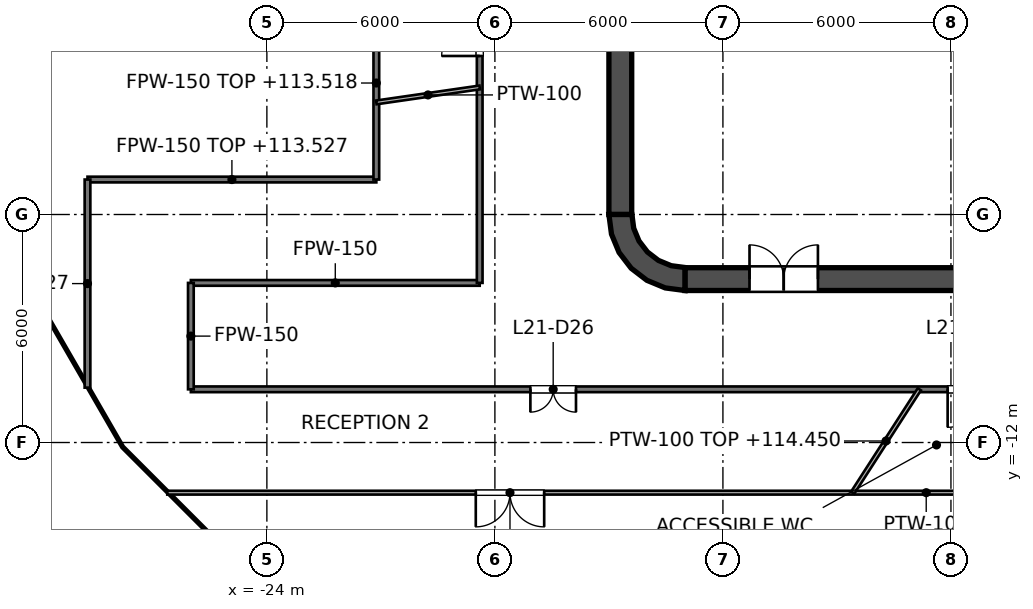
"""IFC4 building model, lengths in metres.
Left out: names, types, materials, properties, quantities, classifications, styles, units other than length and angle.
Written with IfcOpenShell. Run it as: python <this file> out.ifc"""

import sys

from ifc_helpers import new_model, si_unit, direction, frame, frame_2d, origin, place, context, subcontext, project, spatial, polyline, rectangle, outline, extrude, element, fill, save


model = new_model("IFC4")
c1 = context("Model", 3, precision=1e-05, world=origin(), true_north=direction((0.0, 1.0)))
c2 = subcontext(c1, "Body", "Model", "MODEL_VIEW")
j1 = project(units=[si_unit("LENGTHUNIT", "METRE"), si_unit("PLANEANGLEUNIT", "RADIAN")], contexts=[c1])
p1 = place(None, origin())
s1 = spatial("IfcSite", under=j1, at=p1, CompositionType="ELEMENT")
p2 = place(p1, origin())
s2 = spatial("IfcBuilding", under=s1, at=p2, CompositionType="ELEMENT")
p3 = place(p2, frame((0.0, 0.0, 110.4)))
s3 = spatial("IfcBuildingStorey", under=s2, at=p3, CompositionType="ELEMENT", Elevation=110.4)
p4 = place(p3, frame((-13.0, -7.7, 0.0), z_axis=(0.0, 0.0, 1.0), x_axis=(1.0, 0.0, 0.0)))
e1 = element("IfcWall", 1, at=p4, inside=s3, PredefinedType="SHEAR", context=c2, shape_type="SweptSolid", body=[
    extrude(rectangle(XDim=26.0, YDim=0.6, at=frame_2d((13.0, 0.0))), origin(), (0.0, 0.0, 1.0), 4.2),
])
p5 = place(p4, frame((1.7, 0.0, 0.0)))
e2 = element("IfcOpeningElement", 2, at=p5, cuts=e1, PredefinedType="OPENING", context=c2, shape_type="SweptSolid", body=[
    extrude(rectangle(XDim=1.8, YDim=2.1, at=frame_2d((0.9, 1.05))), frame((0.0, 0.3, 0.0), z_axis=(0.0, -1.0, 0.0), x_axis=(1.0, 0.0, 0.0)), (0.0, 0.0, 1.0), 0.6),
])
p6 = place(p4, frame((22.5, 0.0, 0.0)))
e3 = element("IfcOpeningElement", 3, at=p6, cuts=e1, PredefinedType="OPENING", context=c2, shape_type="SweptSolid", body=[
    extrude(rectangle(XDim=1.8, YDim=2.1, at=frame_2d((0.9, 1.05))), frame((0.0, 0.3, 0.0), z_axis=(0.0, -1.0, 0.0), x_axis=(1.0, 0.0, 0.0)), (0.0, 0.0, 1.0), 0.6),
])
p7 = place(p3, frame((-14.7, -6.0, 0.0), z_axis=(0.0, 0.0, 1.0), x_axis=(0.0, 1.0, 0.0)))
e4 = element("IfcWall", 4, at=p7, inside=s3, PredefinedType="SHEAR", context=c2, shape_type="SweptSolid", body=[
    extrude(rectangle(XDim=12.0, YDim=0.6, at=frame_2d((6.0, 0.0))), origin(), (0.0, 0.0, 1.0), 4.2),
])
p8 = place(p3, origin())
e5 = element("IfcWall", 5, at=p8, inside=s3, PredefinedType="SHEAR", context=c2, shape_type="SweptSolid", body=[
    extrude(outline(polyline([(-13.0, -8.0), (-13.0, -7.395), (-13.361, -7.347), (-13.698, -7.208), (-13.986, -6.986), (-14.208, -6.698), (-14.347, -6.361), (-14.395, -6.0), (-15.0, -6.0), (-14.932, -6.518), (-14.732, -7.0), (-14.414, -7.414), (-14.0, -7.732), (-13.518, -7.932), (-13.0, -8.0)])), origin(), (0.0, 0.0, 1.0), 4.2),
])
p9 = place(p3, frame((-9.0, -6.6, 0.0), z_axis=(0.0, 0.0, 1.0), x_axis=(0.0, 1.0, 0.0)))
e6 = element("IfcWall", 6, at=p9, inside=s3, PredefinedType="PARTITIONING", context=c2, shape_type="SweptSolid", body=[
    extrude(rectangle(XDim=2.5, YDim=0.25, at=frame_2d((1.25, 0.0))), origin(), (0.0, 0.0, 1.0), 4.05),
])
p10 = place(p9, frame((0.75, 0.0, 0.0)))
e7 = element("IfcOpeningElement", 7, at=p10, cuts=e6, PredefinedType="OPENING", context=c2, shape_type="SweptSolid", body=[
    extrude(rectangle(XDim=1.0, YDim=2.1, at=frame_2d((0.5, 1.05))), frame((0.0, 0.125, 0.0), z_axis=(0.0, -1.0, 0.0), x_axis=(1.0, 0.0, 0.0)), (0.0, 0.0, 1.0), 0.25),
])
p11 = place(p3, frame((-9.125, -7.0, 0.0), z_axis=(0.0, 0.0, 1.0), x_axis=(1.0, 0.0, 0.0)))
e8 = element("IfcWall", 8, at=p11, inside=s3, PredefinedType="SOLIDWALL", context=c2, shape_type="SweptSolid", body=[
    extrude(rectangle(XDim=18.25, YDim=0.8, at=frame_2d((9.125, 0.0))), origin(), (0.0, 0.0, 1.0), 4.05),
])
p12 = place(p3, frame((-9.125, -3.975, 0.0), z_axis=(0.0, 0.0, 1.0), x_axis=(1.0, 0.0, 0.0)))
e9 = element("IfcWall", 9, at=p12, inside=s3, PredefinedType="SOLIDWALL", context=c2, shape_type="SweptSolid", body=[
    extrude(rectangle(XDim=12.4, YDim=0.25, at=frame_2d((6.2, 0.0))), origin(), (0.0, 0.0, 1.0), 4.05),
])
p13 = place(p12, frame((1.05, 0.0, 0.0)))
e10 = element("IfcOpeningElement", 10, at=p13, cuts=e9, PredefinedType="OPENING", context=c2, shape_type="SweptSolid", body=[
    extrude(rectangle(XDim=1.2, YDim=2.1, at=frame_2d((0.6, 1.05))), frame((0.0, 0.125, 0.0), z_axis=(0.0, -1.0, 0.0), x_axis=(1.0, 0.0, 0.0)), (0.0, 0.0, 1.0), 0.25),
])
p14 = place(p12, frame((4.1, 0.0, 0.0)))
e11 = element("IfcOpeningElement", 11, at=p14, cuts=e9, PredefinedType="OPENING", context=c2, shape_type="SweptSolid", body=[
    extrude(rectangle(XDim=1.2, YDim=2.1, at=frame_2d((0.6, 1.05))), frame((0.0, 0.125, 0.0), z_axis=(0.0, -1.0, 0.0), x_axis=(1.0, 0.0, 0.0)), (0.0, 0.0, 1.0), 0.25),
])
for number, where, z_axis, x_axis in (
    (12, (-9.0, -3.85, 0.0), (0.0, 0.0, 1.0), (0.0, 1.0, 0.0)),
    (13, (-5.95, -3.85, 0.0), (0.0, 0.0, 1.0), (0.0, 1.0, 0.0)),
):
    element("IfcWall", number, at=place(p3, frame(where, z_axis=z_axis, x_axis=x_axis)), inside=s3, PredefinedType="SOLIDWALL", context=c2, shape_type="SweptSolid", body=[
        extrude(rectangle(XDim=2.2, YDim=0.25, at=frame_2d((1.1, 0.0))), origin(), (0.0, 0.0, 1.0), 4.05),
    ])
p15 = place(p3, frame((-11.8, -7.4, 0.0), z_axis=(0.0, 0.0, 1.0), x_axis=(0.0, 1.0, 0.0)))
e14 = element("IfcWall", 14, at=p15, inside=s3, PredefinedType="SOLIDWALL", context=c2, shape_type="SweptSolid", body=[
    extrude(rectangle(XDim=14.8, YDim=0.4, at=frame_2d((7.4, 0.0))), origin(), (0.0, 0.0, 1.0), 4.05),
])
p16 = place(p15, frame((11.2, 0.0, 0.0)))
e15 = element("IfcOpeningElement", 15, at=p16, cuts=e14, PredefinedType="OPENING", context=c2, shape_type="SweptSolid", body=[
    extrude(rectangle(XDim=1.1, YDim=2.1, at=frame_2d((0.55, 1.05))), frame((0.0, 0.2, 0.0), z_axis=(0.0, -1.0, 0.0), x_axis=(1.0, 0.0, 0.0)), (0.0, 0.0, 1.0), 0.4),
])
p17 = place(p15, frame((8.3, 0.0, 0.0)))
e16 = element("IfcOpeningElement", 16, at=p17, cuts=e14, PredefinedType="OPENING", context=c2, shape_type="SweptSolid", body=[
    extrude(rectangle(XDim=1.1, YDim=2.1, at=frame_2d((0.55, 1.05))), frame((0.0, 0.2, 0.0), z_axis=(0.0, -1.0, 0.0), x_axis=(1.0, 0.0, 0.0)), (0.0, 0.0, 1.0), 0.4),
])
p18 = place(p15, frame((5.4, 0.0, 0.0)))
e17 = element("IfcOpeningElement", 17, at=p18, cuts=e14, PredefinedType="OPENING", context=c2, shape_type="SweptSolid", body=[
    extrude(rectangle(XDim=1.1, YDim=2.1, at=frame_2d((0.55, 1.05))), frame((0.0, 0.2, 0.0), z_axis=(0.0, -1.0, 0.0), x_axis=(1.0, 0.0, 0.0)), (0.0, 0.0, 1.0), 0.4),
])
p19 = place(p15, frame((13.552, 0.0, 0.0)))
e18 = element("IfcOpeningElement", 18, at=p19, cuts=e14, PredefinedType="OPENING", context=c2, shape_type="SweptSolid", body=[
    extrude(rectangle(XDim=0.9, YDim=2.1, at=frame_2d((0.45, 1.05))), frame((0.0, 0.2, 0.0), z_axis=(0.0, -1.0, 0.0), x_axis=(1.0, 0.0, 0.0)), (0.0, 0.0, 1.0), 0.4),
])
p20 = place(p15, frame((0.347, 0.0, 0.0)))
e19 = element("IfcOpeningElement", 19, at=p20, cuts=e14, PredefinedType="OPENING", context=c2, shape_type="SweptSolid", body=[
    extrude(rectangle(XDim=0.9, YDim=2.1, at=frame_2d((0.45, 1.05))), frame((0.0, 0.2, 0.0), z_axis=(0.0, -1.0, 0.0), x_axis=(1.0, 0.0, 0.0)), (0.0, 0.0, 1.0), 0.4),
])
e20 = element("IfcWall", 20, at=p8, inside=s3, PredefinedType="SOLIDWALL", context=c2, shape_type="SweptSolid", body=[
    extrude(outline(polyline([(-12.0, -5.925), (-12.0, -5.675), (-14.15, -5.675), (-14.15, -3.025), (-12.0, -3.025), (-12.0, -2.775), (-14.15, -2.775), (-14.15, -0.125), (-12.0, -0.125), (-12.0, 0.125), (-14.15, 0.125), (-14.15, 2.775), (-12.0, 2.775), (-12.0, 3.025), (-14.15, 3.025), (-14.15, 5.675), (-12.0, 5.675), (-12.0, 5.925), (-14.15, 5.925), (-14.4, 5.925), (-14.4, 5.675), (-14.4, 3.025), (-14.4, 2.775), (-14.4, 0.125), (-14.4, -0.125), (-14.4, -2.775), (-14.4, -3.025), (-14.4, -5.675), (-14.4, -5.925), (-14.15, -5.925), (-12.0, -5.925)])), origin(), (0.0, 0.0, 1.0), 4.05),
])
p21 = place(p3, frame((-26.0, -10.6, 0.0), z_axis=(0.0, 0.0, 1.0), x_axis=(1.0, 0.0, 0.0)))
e21 = element("IfcWall", 21, at=p21, inside=s3, PredefinedType="PARTITIONING", context=c2, shape_type="SweptSolid", body=[
    extrude(rectangle(XDim=52.0, YDim=0.15, at=frame_2d((26.0, 0.0))), origin(), (0.0, 0.0, 1.0), 3.127),
])
p22 = place(p21, frame((8.934, 0.0, 0.0)))
e22 = element("IfcOpeningElement", 22, at=p22, cuts=e21, PredefinedType="OPENING", context=c2, shape_type="SweptSolid", body=[
    extrude(rectangle(XDim=1.2, YDim=2.1, at=frame_2d((0.6, 1.05))), frame((0.0, 0.075, 0.0), z_axis=(0.0, -1.0, 0.0), x_axis=(1.0, 0.0, 0.0)), (0.0, 0.0, 1.0), 0.15),
])
p23 = place(p21, frame((19.913, 0.0, 0.0)))
e23 = element("IfcOpeningElement", 23, at=p23, cuts=e21, PredefinedType="OPENING", context=c2, shape_type="SweptSolid", body=[
    extrude(rectangle(XDim=1.0, YDim=2.1, at=frame_2d((0.5, 1.05))), frame((0.0, 0.075, 0.0), z_axis=(0.0, -1.0, 0.0), x_axis=(1.0, 0.0, 0.0)), (0.0, 0.0, 1.0), 0.15),
])
p24 = place(p21, frame((21.763, 0.0, 0.0)))
e24 = element("IfcOpeningElement", 24, at=p24, cuts=e21, PredefinedType="OPENING", context=c2, shape_type="SweptSolid", body=[
    extrude(rectangle(XDim=1.0, YDim=2.1, at=frame_2d((0.5, 1.05))), frame((0.0, 0.075, 0.0), z_axis=(0.0, -1.0, 0.0), x_axis=(1.0, 0.0, 0.0)), (0.0, 0.0, 1.0), 0.15),
])
p25 = place(p21, frame((29.38, 0.0, 0.0)))
e25 = element("IfcOpeningElement", 25, at=p25, cuts=e21, PredefinedType="OPENING", context=c2, shape_type="SweptSolid", body=[
    extrude(rectangle(XDim=1.0, YDim=2.1, at=frame_2d((0.5, 1.05))), frame((0.0, 0.075, 0.0), z_axis=(0.0, -1.0, 0.0), x_axis=(1.0, 0.0, 0.0)), (0.0, 0.0, 1.0), 0.15),
])
p26 = place(p21, frame((41.202, 0.0, 0.0)))
e26 = element("IfcOpeningElement", 26, at=p26, cuts=e21, PredefinedType="OPENING", context=c2, shape_type="SweptSolid", body=[
    extrude(rectangle(XDim=1.0, YDim=2.1, at=frame_2d((0.5, 1.05))), frame((0.0, 0.075, 0.0), z_axis=(0.0, -1.0, 0.0), x_axis=(1.0, 0.0, 0.0)), (0.0, 0.0, 1.0), 0.15),
])
p27 = place(p3, frame((-26.0, -7.8, 0.0), z_axis=(0.0, 0.0, 1.0), x_axis=(1.0, 0.0, 0.0)))
e27 = element("IfcWall", 27, at=p27, inside=s3, PredefinedType="PARTITIONING", context=c2, shape_type="SweptSolid", body=[
    extrude(rectangle(XDim=7.6, YDim=0.15, at=frame_2d((3.8, 0.0))), origin(), (0.0, 0.0, 1.0), 3.195),
])
p28 = place(p3, frame((-28.72, -5.08, 0.0), z_axis=(0.0, 0.0, 1.0), x_axis=(1.0, 0.0, 0.0)))
e28 = element("IfcWall", 28, at=p28, inside=s3, PredefinedType="PARTITIONING", context=c2, shape_type="SweptSolid", body=[
    extrude(rectangle(XDim=7.6, YDim=0.15, at=frame_2d((3.8, 0.0))), origin(), (0.0, 0.0, 1.0), 3.127),
])
p29 = place(p3, frame((-6.365, -23.754, 0.0), z_axis=(0.0, 0.0, 1.0), x_axis=(0.258859748235, 0.965914918998, 0.0)))
e29 = element("IfcWall", 29, at=p29, inside=s3, PredefinedType="PARTITIONING", context=c2, shape_type="SweptSolid", body=[
    extrude(rectangle(XDim=13.618, YDim=0.15, at=frame_2d((6.809, 0.0))), origin(), (0.0, 0.0, 1.0), 3.502),
])
p30 = place(p3, frame((-18.4, -7.8, 0.0), z_axis=(0.0, 0.0, 1.0), x_axis=(0.0, 1.0, 0.0)))
e30 = element("IfcWall", 30, at=p30, inside=s3, PredefinedType="PARTITIONING", context=c2, shape_type="SweptSolid", body=[
    extrude(rectangle(XDim=15.6, YDim=0.15, at=frame_2d((7.8, 0.0))), origin(), (0.0, 0.0, 1.0), 3.118),
])
p31 = place(p30, frame((5.971, 0.0, 0.0)))
e31 = element("IfcOpeningElement", 31, at=p31, cuts=e30, PredefinedType="OPENING", context=c2, shape_type="SweptSolid", body=[
    extrude(rectangle(XDim=1.0, YDim=2.1, at=frame_2d((0.5, 1.05))), frame((0.0, 0.075, 0.0), z_axis=(0.0, -1.0, 0.0), x_axis=(1.0, 0.0, 0.0)), (0.0, 0.0, 1.0), 0.15),
])
p32 = place(p3, frame((-21.12, -5.08, 0.0), z_axis=(0.0, 0.0, 1.0), x_axis=(0.0, 1.0, 0.0)))
e32 = element("IfcWall", 32, at=p32, inside=s3, PredefinedType="PARTITIONING", context=c2, shape_type="SweptSolid", body=[
    extrude(rectangle(XDim=5.08, YDim=0.15, at=frame_2d((2.54, 0.0))), origin(), (0.0, 0.0, 1.0), 3.118),
])
p33 = place(p3, frame((-26.0, -10.6, 0.0), z_axis=(0.0, 0.0, 1.0), x_axis=(0.0, 1.0, 0.0)))
e33 = element("IfcWall", 33, at=p33, inside=s3, PredefinedType="PARTITIONING", context=c2, shape_type="SweptSolid", body=[
    extrude(rectangle(XDim=2.8, YDim=0.15, at=frame_2d((1.4, 0.0))), origin(), (0.0, 0.0, 1.0), 3.195),
])
p34 = place(p3, frame((-28.72, -10.556, 0.0), z_axis=(0.0, 0.0, 1.0), x_axis=(0.0, 1.0, 0.0)))
e34 = element("IfcWall", 34, at=p34, inside=s3, PredefinedType="PARTITIONING", context=c2, shape_type="SweptSolid", body=[
    extrude(rectangle(XDim=5.476, YDim=0.15, at=frame_2d((2.738, 0.0))), origin(), (0.0, 0.0, 1.0), 3.127),
])
p35 = place(p3, frame((-26.621, -13.32, 0.0), z_axis=(0.0, 0.0, 1.0), x_axis=(1.0, 0.0, 0.0)))
e35 = element("IfcWall", 35, at=p35, inside=s3, PredefinedType="PARTITIONING", context=c2, shape_type="SweptSolid", body=[
    extrude(rectangle(XDim=39.941, YDim=0.1, at=frame_2d((19.971, 0.0))), origin(), (0.0, 0.0, 1.0), 3.127),
])
p36 = place(p35, frame((8.118, 0.0, 0.0)))
e36 = element("IfcOpeningElement", 36, at=p36, cuts=e35, PredefinedType="OPENING", context=c2, shape_type="SweptSolid", body=[
    extrude(rectangle(XDim=1.8, YDim=2.1, at=frame_2d((0.9, 1.05))), frame((0.0, 0.05, 0.0), z_axis=(0.0, -1.0, 0.0), x_axis=(1.0, 0.0, 0.0)), (0.0, 0.0, 1.0), 0.1),
])
p37 = place(p35, frame((30.596, 0.0, 0.0)))
e37 = element("IfcOpeningElement", 37, at=p37, cuts=e35, PredefinedType="OPENING", context=c2, shape_type="SweptSolid", body=[
    extrude(rectangle(XDim=1.8, YDim=2.1, at=frame_2d((0.9, 1.05))), frame((0.0, 0.05, 0.0), z_axis=(0.0, -1.0, 0.0), x_axis=(1.0, 0.0, 0.0)), (0.0, 0.0, 1.0), 0.1),
])
p38 = place(p3, frame((-21.12, -3.05, 0.0), z_axis=(0.0, 0.0, 1.0), x_axis=(0.989720814385, 0.143012969948, 0.0)))
e38 = element("IfcWall", 38, at=p38, inside=s3, PredefinedType="PARTITIONING", context=c2, shape_type="SweptSolid", body=[
    extrude(rectangle(XDim=2.749, YDim=0.1, at=frame_2d((1.374, 0.0))), origin(), (0.0, 0.0, 1.0), 3.127),
])
p39 = place(p3, frame((-8.585, -13.32, 0.0), z_axis=(0.0, 0.0, 1.0), x_axis=(0.541714364577, 0.840562637292, 0.0)))
e39 = element("IfcWall", 39, at=p39, inside=s3, PredefinedType="PARTITIONING", context=c2, shape_type="SweptSolid", body=[
    extrude(rectangle(XDim=3.236, YDim=0.1, at=frame_2d((1.618, 0.0))), origin(), (0.0, 0.0, 1.0), 4.05),
])
p40 = place(p18, origin())
e40 = element("IfcDoor", 40, at=p40, inside=s3, OperationType="DOUBLE_DOOR_SLIDING", PredefinedType="DOOR", context=c2, shape_type="SweptSolid", body=[
    extrude(rectangle(XDim=1.1, YDim=2.1, at=frame_2d((0.55, 1.05))), frame((0.0, 0.025, 0.0), z_axis=(0.0, -1.0, 0.0), x_axis=(1.0, 0.0, 0.0)), (0.0, 0.0, 1.0), 0.05),
])
fill(e17, e40)
p41 = place(p13, origin())
e41 = element("IfcDoor", 41, at=p41, inside=s3, OperationType="DOUBLE_DOOR_SLIDING", PredefinedType="DOOR", context=c2, shape_type="SweptSolid", body=[
    extrude(rectangle(XDim=1.2, YDim=2.1, at=frame_2d((0.6, 1.05))), frame((0.0, 0.025, 0.0), z_axis=(0.0, -1.0, 0.0), x_axis=(1.0, 0.0, 0.0)), (0.0, 0.0, 1.0), 0.05),
])
fill(e10, e41)
p42 = place(p10, origin())
e42 = element("IfcDoor", 42, at=p42, inside=s3, OperationType="SINGLE_SWING_LEFT", PredefinedType="DOOR", context=c2, shape_type="SweptSolid", body=[
    extrude(rectangle(XDim=1.0, YDim=2.1, at=frame_2d((0.5, 1.05))), frame((0.0, 0.025, 0.0), z_axis=(0.0, -1.0, 0.0), x_axis=(1.0, 0.0, 0.0)), (0.0, 0.0, 1.0), 0.05),
])
fill(e7, e42)
p43 = place(p20, origin())
e43 = element("IfcDoor", 43, at=p43, inside=s3, OperationType="SINGLE_SWING_LEFT", PredefinedType="DOOR", context=c2, shape_type="SweptSolid", body=[
    extrude(rectangle(XDim=0.9, YDim=2.1, at=frame_2d((0.45, 1.05))), frame((0.0, 0.025, 0.0), z_axis=(0.0, -1.0, 0.0), x_axis=(1.0, 0.0, 0.0)), (0.0, 0.0, 1.0), 0.05),
])
fill(e19, e43)
p44 = place(p5, origin())
e44 = element("IfcDoor", 44, at=p44, inside=s3, OperationType="DOUBLE_DOOR_SINGLE_SWING", PredefinedType="DOOR", context=c2, shape_type="SweptSolid", body=[
    extrude(rectangle(XDim=1.8, YDim=2.1, at=frame_2d((0.9, 1.05))), frame((0.0, 0.025, 0.0), z_axis=(0.0, -1.0, 0.0), x_axis=(1.0, 0.0, 0.0)), (0.0, 0.0, 1.0), 0.05),
])
fill(e2, e44)
p45 = place(p31, origin())
e45 = element("IfcDoor", 45, at=p45, inside=s3, OperationType="SINGLE_SWING_LEFT", PredefinedType="DOOR", context=c2, shape_type="SweptSolid", body=[
    extrude(rectangle(XDim=1.0, YDim=2.1, at=frame_2d((0.5, 1.05))), frame((0.0, 0.025, 0.0), z_axis=(0.0, -1.0, 0.0), x_axis=(1.0, 0.0, 0.0)), (0.0, 0.0, 1.0), 0.05),
])
fill(e31, e45)
p46 = place(p22, origin())
e46 = element("IfcDoor", 46, at=p46, inside=s3, OperationType="DOUBLE_DOOR_SINGLE_SWING", PredefinedType="DOOR", context=c2, shape_type="SweptSolid", body=[
    extrude(rectangle(XDim=1.2, YDim=2.1, at=frame_2d((0.6, 1.05))), frame((0.0, 0.025, 0.0), z_axis=(0.0, -1.0, 0.0), x_axis=(1.0, 0.0, 0.0)), (0.0, 0.0, 1.0), 0.05),
])
fill(e22, e46)
p47 = place(p23, origin())
e47 = element("IfcDoor", 47, at=p47, inside=s3, OperationType="SINGLE_SWING_LEFT", PredefinedType="DOOR", context=c2, shape_type="SweptSolid", body=[
    extrude(rectangle(XDim=1.0, YDim=2.1, at=frame_2d((0.5, 1.05))), frame((0.0, 0.025, 0.0), z_axis=(0.0, -1.0, 0.0), x_axis=(1.0, 0.0, 0.0)), (0.0, 0.0, 1.0), 0.05),
])
fill(e23, e47)
p48 = place(p36, origin())
e48 = element("IfcDoor", 48, at=p48, inside=s3, OperationType="DOUBLE_DOOR_SINGLE_SWING", PredefinedType="DOOR", context=c2, shape_type="SweptSolid", body=[
    extrude(rectangle(XDim=1.8, YDim=2.1, at=frame_2d((0.9, 1.05))), frame((0.0, 0.025, 0.0), z_axis=(0.0, -1.0, 0.0), x_axis=(1.0, 0.0, 0.0)), (0.0, 0.0, 1.0), 0.05),
])
fill(e36, e48)
save(model, sys.argv[1])
